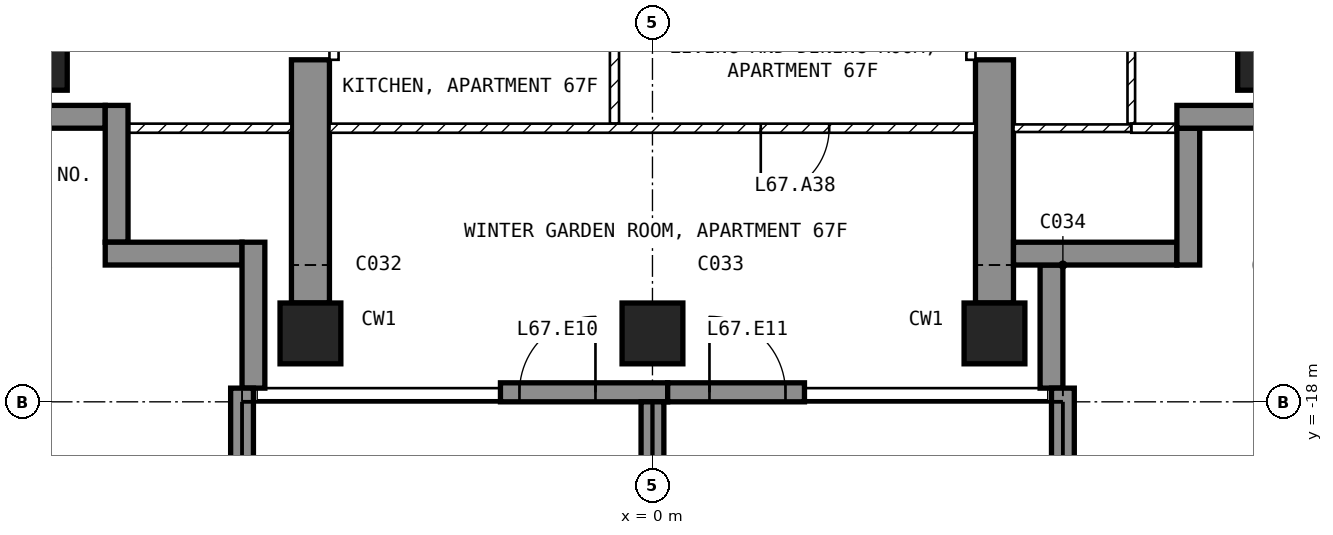
"""IFC4 building model, lengths in metres.
Left out: names, types, materials, properties, quantities, classifications, styles, units other than length and angle.
Written with IfcOpenShell. Run it as: python <this file> out.ifc"""

import sys

from ifc_helpers import new_model, si_unit, direction, frame, frame_2d, origin, origin_2d, place, context, subcontext, project, spatial, polyline, rectangle, outline, extrude, element, fill, save


model = new_model("IFC4")
c1 = context("Model", 3, precision=1e-05, world=origin(), true_north=direction((0.0, 1.0)))
c2 = subcontext(c1, "Body", "Model", "MODEL_VIEW")
j1 = project(units=[si_unit("LENGTHUNIT", "METRE"), si_unit("PLANEANGLEUNIT", "RADIAN")], contexts=[c1])
p1 = place(None, origin())
s1 = spatial("IfcSite", under=j1, at=p1, CompositionType="ELEMENT")
p2 = place(p1, origin())
s2 = spatial("IfcBuilding", under=s1, at=p2, CompositionType="ELEMENT")
p3 = place(p2, frame((0.0, 0.0, 264.0)))
s3 = spatial("IfcBuildingStorey", under=s2, at=p3, CompositionType="ELEMENT", Elevation=264.0)
for number, where, z_axis, x_axis in (
    (1, (-8.1, -13.5, -0.25), (0.0, 0.0, 1.0), (1.0, 0.0, 0.0)),
    (2, (-4.5, -17.1, -0.25), (0.0, 0.0, 1.0), (1.0, 0.0, 0.0)),
    (3, (0.0, -17.1, -0.25), (0.0, 0.0, 1.0), (1.0, 0.0, 0.0)),
    (4, (4.5, -17.1, -0.25), (0.0, 0.0, 1.0), (1.0, 0.0, 0.0)),
    (5, (8.1, -13.5, -0.25), (0.0, 0.0, 1.0), (1.0, 0.0, 0.0)),
):
    element("IfcColumn", number, at=place(p3, frame(where, z_axis=z_axis, x_axis=x_axis)), inside=s3, PredefinedType="COLUMN", context=c2, shape_type="SweptSolid", body=[
        extrude(rectangle(XDim=0.8, YDim=0.8, at=origin_2d()), origin(), (0.0, 0.0, 1.0), 3.5),
    ])
for number, where, z_axis, x_axis in (
    (6, (-4.75, -16.7, -0.25), (1.0, 0.0, 0.0), (0.0, 1.0, 0.0)),
    (7, (4.25, -16.7, -0.25), (1.0, 0.0, 0.0), (0.0, 1.0, 0.0)),
):
    element("IfcWall", number, at=place(p3, frame(where, z_axis=z_axis, x_axis=x_axis)), inside=s3, PredefinedType="SHEAR", context=c2, shape_type="SweptSolid", body=[
        extrude(outline(polyline([(0.0, 0.0), (3.2, 0.0), (3.2, 2.65), (5.6, 2.65), (5.6, 0.0), (7.7, 0.0), (7.7, 3.5), (0.0, 3.5), (0.0, 0.0)])), origin(), (0.0, 0.0, 1.0), 0.5),
    ])
p4 = place(p3, frame((-2.0, -17.875, 0.0), z_axis=(0.0, 0.0, 1.0), x_axis=(1.0, 0.0, 0.0)))
e8 = element("IfcWall", 8, at=p4, inside=s3, PredefinedType="SOLIDWALL", context=c2, shape_type="SweptSolid", body=[
    extrude(rectangle(XDim=2.2, YDim=0.25, at=frame_2d((1.1, 0.0))), origin(), (0.0, 0.0, 1.0), 3.25),
])
p5 = place(p4, frame((0.25, 0.0, 0.0)))
e9 = element("IfcOpeningElement", 9, at=p5, cuts=e8, PredefinedType="OPENING", context=c2, shape_type="SweptSolid", body=[
    extrude(rectangle(XDim=1.0, YDim=2.4, at=frame_2d((0.5, 1.2))), frame((0.0, 0.135, 0.0), z_axis=(0.0, -1.0, 0.0), x_axis=(1.0, 0.0, 0.0)), (0.0, 0.0, 1.0), 0.27),
])
p6 = place(p3, frame((0.2, -17.875, 0.0), z_axis=(0.0, 0.0, 1.0), x_axis=(1.0, 0.0, 0.0)))
e10 = element("IfcWall", 10, at=p6, inside=s3, PredefinedType="SOLIDWALL", context=c2, shape_type="SweptSolid", body=[
    extrude(rectangle(XDim=1.8, YDim=0.25, at=frame_2d((0.9, 0.0))), origin(), (0.0, 0.0, 1.0), 3.25),
])
p7 = place(p6, frame((0.55, 0.0, 0.0)))
e11 = element("IfcOpeningElement", 11, at=p7, cuts=e10, PredefinedType="OPENING", context=c2, shape_type="SweptSolid", body=[
    extrude(rectangle(XDim=1.0, YDim=2.4, at=frame_2d((0.5, 1.2))), frame((0.0, 0.135, 0.0), z_axis=(0.0, -1.0, 0.0), x_axis=(1.0, 0.0, 0.0)), (0.0, 0.0, 1.0), 0.27),
])
p8 = place(p3, frame((5.25, -17.82, 0.0), z_axis=(0.0, 0.0, 1.0), x_axis=(0.0, 1.0, 0.0)))
e12 = element("IfcWall", 12, at=p8, inside=s3, PredefinedType="SOLIDWALL", context=c2, shape_type="SweptSolid", body=[
    extrude(rectangle(XDim=1.62, YDim=0.3, at=frame_2d((0.81, 0.0))), origin(), (0.0, 0.0, 1.0), 3.25),
])
p9 = place(p3, frame((4.75, -16.05, 0.0), z_axis=(0.0, 0.0, 1.0), x_axis=(1.0, 0.0, 0.0)))
e13 = element("IfcWall", 13, at=p9, inside=s3, PredefinedType="SOLIDWALL", context=c2, shape_type="SweptSolid", body=[
    extrude(rectangle(XDim=2.15, YDim=0.3, at=frame_2d((1.075, 0.0))), origin(), (0.0, 0.0, 1.0), 3.25),
])
p10 = place(p3, frame((7.05, -16.2, 0.0), z_axis=(0.0, 0.0, 1.0), x_axis=(0.0, 1.0, 0.0)))
e14 = element("IfcWall", 14, at=p10, inside=s3, PredefinedType="SOLIDWALL", context=c2, shape_type="SweptSolid", body=[
    extrude(rectangle(XDim=1.8, YDim=0.3, at=frame_2d((0.9, 0.0))), origin(), (0.0, 0.0, 1.0), 3.25),
])
p11 = place(p3, frame((6.9, -14.25, 0.0), z_axis=(0.0, 0.0, 1.0), x_axis=(1.0, 0.0, 0.0)))
e15 = element("IfcWall", 15, at=p11, inside=s3, PredefinedType="SOLIDWALL", context=c2, shape_type="SweptSolid", body=[
    extrude(rectangle(XDim=1.85, YDim=0.3, at=frame_2d((0.925, 0.0))), origin(), (0.0, 0.0, 1.0), 3.25),
])
p12 = place(p3, frame((-8.75, -14.25, 0.0), z_axis=(0.0, 0.0, 1.0), x_axis=(1.0, 0.0, 0.0)))
e16 = element("IfcWall", 16, at=p12, inside=s3, PredefinedType="SOLIDWALL", context=c2, shape_type="SweptSolid", body=[
    extrude(rectangle(XDim=1.55, YDim=0.3, at=frame_2d((0.775, 0.0))), origin(), (0.0, 0.0, 1.0), 3.25),
])
p13 = place(p3, frame((-7.05, -14.1, 0.0), z_axis=(0.0, 0.0, 1.0), x_axis=(0.0, -1.0, 0.0)))
e17 = element("IfcWall", 17, at=p13, inside=s3, PredefinedType="SOLIDWALL", context=c2, shape_type="SweptSolid", body=[
    extrude(rectangle(XDim=1.8, YDim=0.3, at=frame_2d((0.9, 0.0))), origin(), (0.0, 0.0, 1.0), 3.25),
])
p14 = place(p3, frame((-7.2, -16.05, 0.0), z_axis=(0.0, 0.0, 1.0), x_axis=(1.0, 0.0, 0.0)))
e18 = element("IfcWall", 18, at=p14, inside=s3, PredefinedType="SOLIDWALL", context=c2, shape_type="SweptSolid", body=[
    extrude(rectangle(XDim=1.8, YDim=0.3, at=frame_2d((0.9, 0.0))), origin(), (0.0, 0.0, 1.0), 3.25),
])
p15 = place(p3, frame((-5.25, -15.9, 0.0), z_axis=(0.0, 0.0, 1.0), x_axis=(0.0, -1.0, 0.0)))
e19 = element("IfcWall", 19, at=p15, inside=s3, PredefinedType="SOLIDWALL", context=c2, shape_type="SweptSolid", body=[
    extrude(rectangle(XDim=1.92, YDim=0.3, at=frame_2d((0.96, 0.0))), origin(), (0.0, 0.0, 1.0), 3.25),
])
p16 = place(p3, frame((-5.4, -17.82, 0.0), z_axis=(0.0, 0.0, 1.0), x_axis=(0.0, -1.0, 0.0)))
e20 = element("IfcWall", 20, at=p16, inside=s3, PredefinedType="SOLIDWALL", context=c2, shape_type="SweptSolid", body=[
    extrude(rectangle(XDim=2.88, YDim=0.3, at=frame_2d((1.44, 0.0))), origin(), (0.0, 0.0, 1.0), 3.25),
])
p17 = place(p3, frame((0.0, -18.0, 0.0), z_axis=(0.0, 0.0, 1.0), x_axis=(0.0, -1.0, 0.0)))
e21 = element("IfcWall", 21, at=p17, inside=s3, PredefinedType="SOLIDWALL", context=c2, shape_type="SweptSolid", body=[
    extrude(rectangle(XDim=2.7, YDim=0.3, at=frame_2d((1.35, 0.0))), origin(), (0.0, 0.0, 1.0), 3.25),
])
p18 = place(p3, frame((5.4, -17.82, 0.0), z_axis=(0.0, 0.0, 1.0), x_axis=(0.0, -1.0, 0.0)))
e22 = element("IfcWall", 22, at=p18, inside=s3, PredefinedType="SOLIDWALL", context=c2, shape_type="SweptSolid", body=[
    extrude(rectangle(XDim=2.88, YDim=0.3, at=frame_2d((1.44, 0.0))), origin(), (0.0, 0.0, 1.0), 3.25),
])
p19 = place(p3, frame((-0.5, -14.34, 0.0), z_axis=(0.0, 0.0, 1.0), x_axis=(0.0, 1.0, 0.0)))
e23 = element("IfcWall", 23, at=p19, inside=s3, PredefinedType="PARTITIONING", context=c2, shape_type="SweptSolid", body=[
    extrude(rectangle(XDim=2.88, YDim=0.12, at=frame_2d((1.44, 0.0))), origin(), (0.0, 0.0, 1.0), 3.25),
])
p20 = place(p19, frame((0.99, 0.0, 0.0)))
e24 = element("IfcOpeningElement", 24, at=p20, cuts=e23, PredefinedType="OPENING", context=c2, shape_type="SweptSolid", body=[
    extrude(rectangle(XDim=0.9, YDim=2.1, at=frame_2d((0.45, 1.05))), frame((0.0, 0.07, 0.0), z_axis=(0.0, -1.0, 0.0), x_axis=(1.0, 0.0, 0.0)), (0.0, 0.0, 1.0), 0.14),
])
p21 = place(p3, frame((4.25, -14.4, 0.0), z_axis=(0.0, 0.0, 1.0), x_axis=(-1.0, 0.0, 0.0)))
e25 = element("IfcWall", 25, at=p21, inside=s3, PredefinedType="PARTITIONING", context=c2, shape_type="SweptSolid", body=[
    extrude(rectangle(XDim=8.5, YDim=0.12, at=frame_2d((4.25, 0.0))), origin(), (0.0, 0.0, 1.0), 3.25),
])
p22 = place(p21, frame((1.925, 0.0, 0.0)))
e26 = element("IfcOpeningElement", 26, at=p22, cuts=e25, PredefinedType="OPENING", context=c2, shape_type="SweptSolid", body=[
    extrude(rectangle(XDim=0.9, YDim=2.1, at=frame_2d((0.45, 1.05))), frame((0.0, 0.07, 0.0), z_axis=(0.0, -1.0, 0.0), x_axis=(1.0, 0.0, 0.0)), (0.0, 0.0, 1.0), 0.14),
])
p23 = place(p3, frame((6.3, -14.34, 0.0), z_axis=(0.0, 0.0, 1.0), x_axis=(0.0, 1.0, 0.0)))
e27 = element("IfcWall", 27, at=p23, inside=s3, PredefinedType="PARTITIONING", context=c2, shape_type="SweptSolid", body=[
    extrude(rectangle(XDim=2.89, YDim=0.1, at=frame_2d((1.445, 0.0))), origin(), (0.0, 0.0, 1.0), 3.25),
])
p24 = place(p23, frame((1.02, 0.0, 0.0)))
e28 = element("IfcOpeningElement", 28, at=p24, cuts=e27, PredefinedType="OPENING", context=c2, shape_type="SweptSolid", body=[
    extrude(rectangle(XDim=0.85, YDim=2.1, at=frame_2d((0.425, 1.05))), frame((0.0, 0.06, 0.0), z_axis=(0.0, -1.0, 0.0), x_axis=(1.0, 0.0, 0.0)), (0.0, 0.0, 1.0), 0.12),
])
p25 = place(p3, frame((7.12, -14.4, 0.0), z_axis=(0.0, 0.0, 1.0), x_axis=(-1.0, 0.0, 0.0)))
e29 = element("IfcWall", 29, at=p25, inside=s3, PredefinedType="PARTITIONING", context=c2, shape_type="SweptSolid", body=[
    extrude(rectangle(XDim=0.82, YDim=0.12, at=frame_2d((0.41, 0.0))), origin(), (0.0, 0.0, 1.0), 3.25),
])
p26 = place(p3, frame((6.3, -14.4, 0.0), z_axis=(0.0, 0.0, 1.0), x_axis=(-1.0, 0.0, 0.0)))
e30 = element("IfcWall", 30, at=p26, inside=s3, PredefinedType="PARTITIONING", context=c2, shape_type="SweptSolid", body=[
    extrude(rectangle(XDim=1.55, YDim=0.1, at=frame_2d((0.775, 0.0))), origin(), (0.0, 0.0, 1.0), 3.25),
])
p27 = place(p3, frame((-4.75, -14.4, 0.0), z_axis=(0.0, 0.0, 1.0), x_axis=(-1.0, 0.0, 0.0)))
e31 = element("IfcWall", 31, at=p27, inside=s3, PredefinedType="PARTITIONING", context=c2, shape_type="SweptSolid", body=[
    extrude(rectangle(XDim=2.37, YDim=0.12, at=frame_2d((1.185, 0.0))), origin(), (0.0, 0.0, 1.0), 3.25),
])
p28 = place(p3, frame((4.19, -11.1, 0.0), z_axis=(0.0, 0.0, 1.0), x_axis=(0.0, -1.0, 0.0)))
e32 = element("IfcWall", 32, at=p28, inside=s3, PredefinedType="PARTITIONING", context=c2, shape_type="SweptSolid", body=[
    extrude(rectangle(XDim=2.4, YDim=0.12, at=frame_2d((1.2, 0.0))), origin(), (0.0, 0.0, 1.0), 2.4),
])
p29 = place(p28, frame((0.75, 0.0, 0.0)))
e33 = element("IfcOpeningElement", 33, at=p29, cuts=e32, PredefinedType="OPENING", context=c2, shape_type="SweptSolid", body=[
    extrude(rectangle(XDim=0.9, YDim=2.1, at=frame_2d((0.45, 1.05))), frame((0.0, 0.07, 0.0), z_axis=(0.0, -1.0, 0.0), x_axis=(1.0, 0.0, 0.0)), (0.0, 0.0, 1.0), 0.14),
])
p30 = place(p3, frame((-4.19, -11.1, 0.0), z_axis=(0.0, 0.0, 1.0), x_axis=(0.0, -1.0, 0.0)))
e34 = element("IfcWall", 34, at=p30, inside=s3, PredefinedType="PARTITIONING", context=c2, shape_type="SweptSolid", body=[
    extrude(rectangle(XDim=2.4, YDim=0.12, at=frame_2d((1.2, 0.0))), origin(), (0.0, 0.0, 1.0), 2.4),
])
p31 = place(p30, frame((0.75, 0.0, 0.0)))
e35 = element("IfcOpeningElement", 35, at=p31, cuts=e34, PredefinedType="OPENING", context=c2, shape_type="SweptSolid", body=[
    extrude(rectangle(XDim=0.9, YDim=2.1, at=frame_2d((0.45, 1.05))), frame((0.0, 0.07, 0.0), z_axis=(0.0, -1.0, 0.0), x_axis=(1.0, 0.0, 0.0)), (0.0, 0.0, 1.0), 0.14),
])
p32 = place(p5, origin())
e36 = element("IfcDoor", 36, at=p32, inside=s3, OperationType="SINGLE_SWING_RIGHT", PredefinedType="DOOR", context=c2, shape_type="SweptSolid", body=[
    extrude(rectangle(XDim=1.0, YDim=2.4, at=frame_2d((0.5, 1.2))), frame((0.0, 0.025, 0.0), z_axis=(0.0, -1.0, 0.0), x_axis=(1.0, 0.0, 0.0)), (0.0, 0.0, 1.0), 0.05),
])
fill(e9, e36)
p33 = place(p7, origin())
e37 = element("IfcDoor", 37, at=p33, inside=s3, OperationType="SINGLE_SWING_LEFT", PredefinedType="DOOR", context=c2, shape_type="SweptSolid", body=[
    extrude(rectangle(XDim=1.0, YDim=2.4, at=frame_2d((0.5, 1.2))), frame((0.0, 0.025, 0.0), z_axis=(0.0, -1.0, 0.0), x_axis=(1.0, 0.0, 0.0)), (0.0, 0.0, 1.0), 0.05),
])
fill(e11, e37)
p34 = place(p22, origin())
e38 = element("IfcDoor", 38, at=p34, inside=s3, OperationType="SINGLE_SWING_RIGHT", PredefinedType="DOOR", context=c2, shape_type="SweptSolid", body=[
    extrude(rectangle(XDim=0.9, YDim=2.1, at=frame_2d((0.45, 1.05))), frame((0.0, 0.025, 0.0), z_axis=(0.0, -1.0, 0.0), x_axis=(1.0, 0.0, 0.0)), (0.0, 0.0, 1.0), 0.05),
])
fill(e26, e38)
save(model, sys.argv[1])
